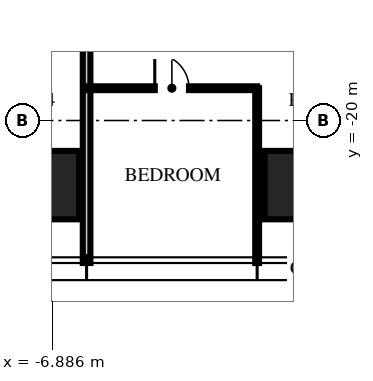
"""IFC4 building model, lengths in metres.
Left out: names, types, materials, properties, quantities, classifications, styles, units other than length and angle.
Written with IfcOpenShell. Run it as: python <this file> out.ifc"""

import sys

from ifc_helpers import new_model, si_unit, direction, frame, frame_2d, origin, origin_2d, place, context, subcontext, project, spatial, rectangle, extrude, element, fill, save


model = new_model("IFC4")
c1 = context("Model", 3, precision=1e-05, world=origin(), true_north=direction((0.0, 1.0)))
c2 = subcontext(c1, "Body", "Model", "MODEL_VIEW")
j1 = project(units=[si_unit("LENGTHUNIT", "METRE"), si_unit("PLANEANGLEUNIT", "RADIAN")], contexts=[c1])
p1 = place(None, origin())
s1 = spatial("IfcSite", under=j1, at=p1, CompositionType="ELEMENT")
p2 = place(p1, origin())
s2 = spatial("IfcBuilding", under=s1, at=p2, CompositionType="ELEMENT")
p3 = place(p2, frame((0.0, 0.0, 289.5)))
s3 = spatial("IfcBuildingStorey", under=s2, at=p3, CompositionType="ELEMENT", Elevation=289.5)
for number, where, z_axis, x_axis in (
    (1, (0.0, -21.7, 0.0), (0.0, 0.0, 1.0), (1.0, 0.0, 0.0)),
    (2, (-7.48, -21.7, 0.0), (0.0, 0.0, 1.0), (1.0, 0.0, 0.0)),
):
    element("IfcColumn", number, at=place(p3, frame(where, z_axis=z_axis, x_axis=x_axis)), inside=s3, PredefinedType="COLUMN", context=c2, shape_type="SweptSolid", body=[
        extrude(rectangle(XDim=2.6, YDim=1.8, at=origin_2d()), origin(), (0.0, 0.0, 1.0), 3.75),
    ])
p4 = place(p3, frame((-5.984, -12.65, 0.0), z_axis=(0.0, 0.0, 1.0), x_axis=(0.0, -1.0, 0.0)))
e3 = element("IfcWall", 3, at=p4, inside=s3, PredefinedType="PARTITIONING", context=c2, shape_type="SweptSolid", body=[
    extrude(rectangle(XDim=11.1, YDim=0.2, at=frame_2d((5.55, 0.0))), origin(), (0.0, 0.0, 1.0), 3.01),
])
p5 = place(p3, frame((-1.496, -19.15, 0.0), z_axis=(0.0, 0.0, 1.0), x_axis=(0.0, -1.0, 0.0)))
e4 = element("IfcWall", 4, at=p5, inside=s3, PredefinedType="PARTITIONING", context=c2, shape_type="SweptSolid", body=[
    extrude(rectangle(XDim=4.6, YDim=0.1, at=frame_2d((2.3, 0.0))), origin(), (0.0, 0.0, 1.0), 3.01),
])
p6 = place(p3, frame((-5.984, -19.15, 0.0), z_axis=(0.0, 0.0, 1.0), x_axis=(1.0, 0.0, 0.0)))
e5 = element("IfcWall", 5, at=p6, inside=s3, PredefinedType="PARTITIONING", context=c2, shape_type="SweptSolid", body=[
    extrude(rectangle(XDim=4.488, YDim=0.1, at=frame_2d((2.244, 0.0))), origin(), (0.0, 0.0, 1.0), 2.91),
])
p7 = place(p6, frame((1.794, 0.0, 0.0)))
e6 = element("IfcOpeningElement", 6, at=p7, cuts=e5, PredefinedType="OPENING", context=c2, shape_type="SweptSolid", body=[
    extrude(rectangle(XDim=0.9, YDim=2.1, at=frame_2d((0.45, 1.05))), frame((0.0, 0.06, 0.0), z_axis=(0.0, -1.0, 0.0), x_axis=(1.0, 0.0, 0.0)), (0.0, 0.0, 1.0), 0.12),
])
p8 = place(p7, origin())
e7 = element("IfcDoor", 7, at=p8, inside=s3, OperationType="SINGLE_SWING_LEFT", PredefinedType="DOOR", context=c2, shape_type="SweptSolid", body=[
    extrude(rectangle(XDim=0.9, YDim=2.1, at=frame_2d((0.45, 1.05))), frame((0.0, 0.025, 0.0), z_axis=(0.0, -1.0, 0.0), x_axis=(1.0, 0.0, 0.0)), (0.0, 0.0, 1.0), 0.05),
])
fill(e6, e7)
save(model, sys.argv[1])
